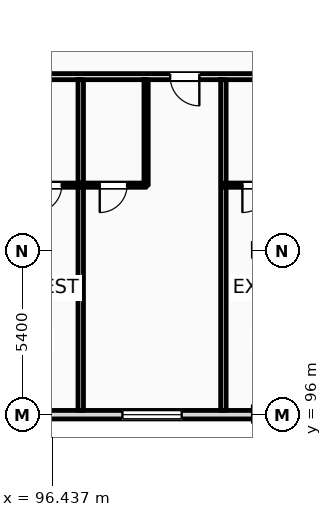
"""IFC4 building model, lengths in metres.
Left out: names, types, materials, properties, quantities, classifications, styles, units other than length and angle.
Written with IfcOpenShell. Run it as: python <this file> out.ifc"""

import sys

from ifc_helpers import new_model, si_unit, direction, frame, frame_2d, origin, place, context, subcontext, project, spatial, rectangle, extrude, element, fill, save


model = new_model("IFC4")
c1 = context("Model", 3, precision=1e-05, world=origin(), true_north=direction((0.0, 1.0)))
c2 = subcontext(c1, "Body", "Model", "MODEL_VIEW")
j1 = project(units=[si_unit("LENGTHUNIT", "METRE"), si_unit("PLANEANGLEUNIT", "RADIAN")], contexts=[c1])
p1 = place(None, origin())
s1 = spatial("IfcSite", under=j1, at=p1, CompositionType="ELEMENT")
p2 = place(p1, origin())
s2 = spatial("IfcBuilding", under=s1, at=p2, CompositionType="ELEMENT")
p3 = place(p2, frame((0.0, 0.0, 31.8)))
s3 = spatial("IfcBuildingStorey", under=s2, at=p3, CompositionType="ELEMENT", Elevation=31.8)
p4 = place(p3, frame((25.2, 96.0, 0.0), z_axis=(0.0, 0.0, 1.0), x_axis=(1.0, 0.0, 0.0)))
e1 = element("IfcWall", 1, at=p4, inside=s3, PredefinedType="STANDARD", context=c2, shape_type="SweptSolid", body=[
    extrude(rectangle(XDim=94.8, YDim=0.28, at=frame_2d((47.4, 0.0))), origin(), (0.0, 0.0, 1.0), 2.72),
])
p5 = place(p4, frame((16.394, 0.0, 0.9)))
e2 = element("IfcOpeningElement", 2, at=p5, cuts=e1, PredefinedType="OPENING", context=c2, shape_type="SweptSolid", body=[
    extrude(rectangle(XDim=2.0, YDim=1.64, at=frame_2d((1.0, 0.82))), frame((0.0, 0.15, 0.0), z_axis=(0.0, -1.0, 0.0), x_axis=(1.0, 0.0, 0.0)), (0.0, 0.0, 1.0), 0.3),
])
p6 = place(p4, frame((20.207, 0.0, 0.9)))
e3 = element("IfcOpeningElement", 3, at=p6, cuts=e1, PredefinedType="OPENING", context=c2, shape_type="SweptSolid", body=[
    extrude(rectangle(XDim=2.3, YDim=1.64, at=frame_2d((1.15, 0.82))), frame((0.0, 0.15, 0.0), z_axis=(0.0, -1.0, 0.0), x_axis=(1.0, 0.0, 0.0)), (0.0, 0.0, 1.0), 0.3),
])
p7 = place(p4, frame((24.287, 0.0, 0.9)))
e4 = element("IfcOpeningElement", 4, at=p7, cuts=e1, PredefinedType="OPENING", context=c2, shape_type="SweptSolid", body=[
    extrude(rectangle(XDim=2.358, YDim=1.64, at=frame_2d((1.179, 0.82))), frame((0.0, 0.15, 0.0), z_axis=(0.0, -1.0, 0.0), x_axis=(1.0, 0.0, 0.0)), (0.0, 0.0, 1.0), 0.3),
])
p8 = place(p4, frame((27.665, 0.0, 0.9)))
e5 = element("IfcOpeningElement", 5, at=p8, cuts=e1, PredefinedType="OPENING", context=c2, shape_type="SweptSolid", body=[
    extrude(rectangle(XDim=1.8, YDim=1.64, at=frame_2d((0.9, 0.82))), frame((0.0, 0.15, 0.0), z_axis=(0.0, -1.0, 0.0), x_axis=(1.0, 0.0, 0.0)), (0.0, 0.0, 1.0), 0.3),
])
p9 = place(p4, frame((32.103, 0.0, 0.9)))
e6 = element("IfcOpeningElement", 6, at=p9, cuts=e1, PredefinedType="OPENING", context=c2, shape_type="SweptSolid", body=[
    extrude(rectangle(XDim=2.359, YDim=1.64, at=frame_2d((1.179, 0.82))), frame((0.0, 0.15, 0.0), z_axis=(0.0, -1.0, 0.0), x_axis=(1.0, 0.0, 0.0)), (0.0, 0.0, 1.0), 0.3),
])
p10 = place(p4, frame((36.336, 0.0, 0.9)))
e7 = element("IfcOpeningElement", 7, at=p10, cuts=e1, PredefinedType="OPENING", context=c2, shape_type="SweptSolid", body=[
    extrude(rectangle(XDim=1.2, YDim=1.64, at=frame_2d((0.6, 0.82))), frame((0.0, 0.15, 0.0), z_axis=(0.0, -1.0, 0.0), x_axis=(1.0, 0.0, 0.0)), (0.0, 0.0, 1.0), 0.3),
])
p11 = place(p4, frame((56.177, 0.0, 0.9)))
e8 = element("IfcOpeningElement", 8, at=p11, cuts=e1, PredefinedType="OPENING", context=c2, shape_type="SweptSolid", body=[
    extrude(rectangle(XDim=1.35, YDim=1.64, at=frame_2d((0.675, 0.82))), frame((0.0, 0.15, 0.0), z_axis=(0.0, -1.0, 0.0), x_axis=(1.0, 0.0, 0.0)), (0.0, 0.0, 1.0), 0.3),
])
p12 = place(p4, frame((60.086, 0.0, 0.9)))
e9 = element("IfcOpeningElement", 9, at=p12, cuts=e1, PredefinedType="OPENING", context=c2, shape_type="SweptSolid", body=[
    extrude(rectangle(XDim=1.5, YDim=1.64, at=frame_2d((0.75, 0.82))), frame((0.0, 0.15, 0.0), z_axis=(0.0, -1.0, 0.0), x_axis=(1.0, 0.0, 0.0)), (0.0, 0.0, 1.0), 0.3),
])
p13 = place(p4, frame((64.838, 0.0, 0.9)))
e10 = element("IfcOpeningElement", 10, at=p13, cuts=e1, PredefinedType="OPENING", context=c2, shape_type="SweptSolid", body=[
    extrude(rectangle(XDim=1.65, YDim=1.64, at=frame_2d((0.825, 0.82))), frame((0.0, 0.15, 0.0), z_axis=(0.0, -1.0, 0.0), x_axis=(1.0, 0.0, 0.0)), (0.0, 0.0, 1.0), 0.3),
])
p14 = place(p4, frame((68.419, 0.0, 0.9)))
e11 = element("IfcOpeningElement", 11, at=p14, cuts=e1, PredefinedType="OPENING", context=c2, shape_type="SweptSolid", body=[
    extrude(rectangle(XDim=0.9, YDim=1.64, at=frame_2d((0.45, 0.82))), frame((0.0, 0.15, 0.0), z_axis=(0.0, -1.0, 0.0), x_axis=(1.0, 0.0, 0.0)), (0.0, 0.0, 1.0), 0.3),
])
p15 = place(p4, frame((73.544, 0.0, 0.9)))
e12 = element("IfcOpeningElement", 12, at=p15, cuts=e1, PredefinedType="OPENING", context=c2, shape_type="SweptSolid", body=[
    extrude(rectangle(XDim=1.95, YDim=1.64, at=frame_2d((0.975, 0.82))), frame((0.0, 0.15, 0.0), z_axis=(0.0, -1.0, 0.0), x_axis=(1.0, 0.0, 0.0)), (0.0, 0.0, 1.0), 0.3),
])
p16 = place(p4, frame((78.897, 0.0, 0.9)))
e13 = element("IfcOpeningElement", 13, at=p16, cuts=e1, PredefinedType="OPENING", context=c2, shape_type="SweptSolid", body=[
    extrude(rectangle(XDim=1.35, YDim=1.64, at=frame_2d((0.675, 0.82))), frame((0.0, 0.15, 0.0), z_axis=(0.0, -1.0, 0.0), x_axis=(1.0, 0.0, 0.0)), (0.0, 0.0, 1.0), 0.3),
])
p17 = place(p4, frame((82.249, 0.0, 0.9)))
e14 = element("IfcOpeningElement", 14, at=p17, cuts=e1, PredefinedType="OPENING", context=c2, shape_type="SweptSolid", body=[
    extrude(rectangle(XDim=2.25, YDim=1.64, at=frame_2d((1.125, 0.82))), frame((0.0, 0.15, 0.0), z_axis=(0.0, -1.0, 0.0), x_axis=(1.0, 0.0, 0.0)), (0.0, 0.0, 1.0), 0.3),
])
p18 = place(p4, frame((87.202, 0.0, 0.9)))
e15 = element("IfcOpeningElement", 15, at=p18, cuts=e1, PredefinedType="OPENING", context=c2, shape_type="SweptSolid", body=[
    extrude(rectangle(XDim=1.8, YDim=1.64, at=frame_2d((0.9, 0.82))), frame((0.0, 0.15, 0.0), z_axis=(0.0, -1.0, 0.0), x_axis=(1.0, 0.0, 0.0)), (0.0, 0.0, 1.0), 0.3),
])
p19 = place(p4, frame((90.867, 0.0, 0.9)))
e16 = element("IfcOpeningElement", 16, at=p19, cuts=e1, PredefinedType="OPENING", context=c2, shape_type="SweptSolid", body=[
    extrude(rectangle(XDim=2.55, YDim=1.64, at=frame_2d((1.275, 0.82))), frame((0.0, 0.15, 0.0), z_axis=(0.0, -1.0, 0.0), x_axis=(1.0, 0.0, 0.0)), (0.0, 0.0, 1.0), 0.3),
])
p20 = place(p3, frame((79.76, 107.12, 0.0), z_axis=(0.0, 0.0, 1.0), x_axis=(1.0, 0.0, 0.0)))
e17 = element("IfcWall", 17, at=p20, inside=s3, PredefinedType="PARTITIONING", context=c2, shape_type="SweptSolid", body=[
    extrude(rectangle(XDim=40.1, YDim=0.2, at=frame_2d((20.05, 0.0))), origin(), (0.0, 0.0, 1.0), 3.36),
])
p21 = place(p20, frame((2.887, 0.0, 0.0)))
e18 = element("IfcOpeningElement", 18, at=p21, cuts=e17, PredefinedType="OPENING", context=c2, shape_type="SweptSolid", body=[
    extrude(rectangle(XDim=0.96, YDim=2.2, at=frame_2d((0.48, 1.1))), frame((0.0, 0.11, 0.0), z_axis=(0.0, -1.0, 0.0), x_axis=(1.0, 0.0, 0.0)), (0.0, 0.0, 1.0), 0.22),
])
p22 = place(p20, frame((5.121, 0.0, 0.0)))
e19 = element("IfcOpeningElement", 19, at=p22, cuts=e17, PredefinedType="OPENING", context=c2, shape_type="SweptSolid", body=[
    extrude(rectangle(XDim=0.96, YDim=2.2, at=frame_2d((0.48, 1.1))), frame((0.0, 0.11, 0.0), z_axis=(0.0, -1.0, 0.0), x_axis=(1.0, 0.0, 0.0)), (0.0, 0.0, 1.0), 0.22),
])
p23 = place(p20, frame((11.698, 0.0, 0.0)))
e20 = element("IfcOpeningElement", 20, at=p23, cuts=e17, PredefinedType="OPENING", context=c2, shape_type="SweptSolid", body=[
    extrude(rectangle(XDim=0.96, YDim=2.2, at=frame_2d((0.48, 1.1))), frame((0.0, 0.11, 0.0), z_axis=(0.0, -1.0, 0.0), x_axis=(1.0, 0.0, 0.0)), (0.0, 0.0, 1.0), 0.22),
])
p24 = place(p20, frame((13.976, 0.0, 0.0)))
e21 = element("IfcOpeningElement", 21, at=p24, cuts=e17, PredefinedType="OPENING", context=c2, shape_type="SweptSolid", body=[
    extrude(rectangle(XDim=0.96, YDim=2.2, at=frame_2d((0.48, 1.1))), frame((0.0, 0.11, 0.0), z_axis=(0.0, -1.0, 0.0), x_axis=(1.0, 0.0, 0.0)), (0.0, 0.0, 1.0), 0.22),
])
p25 = place(p20, frame((20.554, 0.0, 0.0)))
e22 = element("IfcOpeningElement", 22, at=p25, cuts=e17, PredefinedType="OPENING", context=c2, shape_type="SweptSolid", body=[
    extrude(rectangle(XDim=0.96, YDim=2.2, at=frame_2d((0.48, 1.1))), frame((0.0, 0.11, 0.0), z_axis=(0.0, -1.0, 0.0), x_axis=(1.0, 0.0, 0.0)), (0.0, 0.0, 1.0), 0.22),
])
p26 = place(p20, frame((24.982, 0.0, 0.0)))
e23 = element("IfcOpeningElement", 23, at=p26, cuts=e17, PredefinedType="OPENING", context=c2, shape_type="SweptSolid", body=[
    extrude(rectangle(XDim=0.96, YDim=2.2, at=frame_2d((0.48, 1.1))), frame((0.0, 0.11, 0.0), z_axis=(0.0, -1.0, 0.0), x_axis=(1.0, 0.0, 0.0)), (0.0, 0.0, 1.0), 0.22),
])
p27 = place(p20, frame((29.409, 0.0, 0.0)))
e24 = element("IfcOpeningElement", 24, at=p27, cuts=e17, PredefinedType="OPENING", context=c2, shape_type="SweptSolid", body=[
    extrude(rectangle(XDim=0.96, YDim=2.2, at=frame_2d((0.48, 1.1))), frame((0.0, 0.11, 0.0), z_axis=(0.0, -1.0, 0.0), x_axis=(1.0, 0.0, 0.0)), (0.0, 0.0, 1.0), 0.22),
])
p28 = place(p20, frame((33.837, 0.0, 0.0)))
e25 = element("IfcOpeningElement", 25, at=p28, cuts=e17, PredefinedType="OPENING", context=c2, shape_type="SweptSolid", body=[
    extrude(rectangle(XDim=0.96, YDim=2.2, at=frame_2d((0.48, 1.1))), frame((0.0, 0.11, 0.0), z_axis=(0.0, -1.0, 0.0), x_axis=(1.0, 0.0, 0.0)), (0.0, 0.0, 1.0), 0.22),
])
p29 = place(p20, frame((36.027, 0.0, 0.0)))
e26 = element("IfcOpeningElement", 26, at=p29, cuts=e17, PredefinedType="OPENING", context=c2, shape_type="SweptSolid", body=[
    extrude(rectangle(XDim=0.96, YDim=2.2, at=frame_2d((0.48, 1.1))), frame((0.0, 0.11, 0.0), z_axis=(0.0, -1.0, 0.0), x_axis=(1.0, 0.0, 0.0)), (0.0, 0.0, 1.0), 0.22),
])
p30 = place(p3, frame((97.373, 96.14, 0.0), z_axis=(0.0, 0.0, 1.0), x_axis=(0.0, 1.0, 0.0)))
e27 = element("IfcWall", 27, at=p30, inside=s3, PredefinedType="PARTITIONING", context=c2, shape_type="SweptSolid", body=[
    extrude(rectangle(XDim=10.88, YDim=0.18, at=frame_2d((5.44, 0.0))), origin(), (0.0, 0.0, 1.0), 3.36),
])
p31 = place(p3, frame((95.223, 103.55, 0.0), z_axis=(0.0, 0.0, 1.0), x_axis=(1.0, 0.0, 0.0)))
e28 = element("IfcWall", 28, at=p31, inside=s3, PredefinedType="PARTITIONING", context=c2, shape_type="SweptSolid", body=[
    extrude(rectangle(XDim=2.15, YDim=0.14, at=frame_2d((1.075, 0.0))), origin(), (0.0, 0.0, 1.0), 3.36),
])
p32 = place(p31, frame((0.625, 0.0, 0.0)))
e29 = element("IfcOpeningElement", 29, at=p32, cuts=e28, PredefinedType="OPENING", context=c2, shape_type="SweptSolid", body=[
    extrude(rectangle(XDim=0.9, YDim=2.1, at=frame_2d((0.45, 1.05))), frame((0.0, 0.08, 0.0), z_axis=(0.0, -1.0, 0.0), x_axis=(1.0, 0.0, 0.0)), (0.0, 0.0, 1.0), 0.16),
])
p33 = place(p3, frame((102.065, 96.14, 0.0), z_axis=(0.0, 0.0, 1.0), x_axis=(0.0, 1.0, 0.0)))
e30 = element("IfcWall", 30, at=p33, inside=s3, PredefinedType="PARTITIONING", context=c2, shape_type="SweptSolid", body=[
    extrude(rectangle(XDim=10.88, YDim=0.18, at=frame_2d((5.44, 0.0))), origin(), (0.0, 0.0, 1.0), 3.36),
])
p34 = place(p3, frame((99.523, 103.55, 0.0), z_axis=(0.0, 0.0, 1.0), x_axis=(0.0, 1.0, 0.0)))
e31 = element("IfcWall", 31, at=p34, inside=s3, PredefinedType="PARTITIONING", context=c2, shape_type="SweptSolid", body=[
    extrude(rectangle(XDim=3.47, YDim=0.14, at=frame_2d((1.735, 0.0))), origin(), (0.0, 0.0, 1.0), 3.36),
])
p35 = place(p3, frame((97.373, 103.55, 0.0), z_axis=(0.0, 0.0, 1.0), x_axis=(1.0, 0.0, 0.0)))
e32 = element("IfcWall", 32, at=p35, inside=s3, PredefinedType="PARTITIONING", context=c2, shape_type="SweptSolid", body=[
    extrude(rectangle(XDim=2.15, YDim=0.14, at=frame_2d((1.075, 0.0))), origin(), (0.0, 0.0, 1.0), 3.36),
])
p36 = place(p35, frame((0.625, 0.0, 0.0)))
e33 = element("IfcOpeningElement", 33, at=p36, cuts=e32, PredefinedType="OPENING", context=c2, shape_type="SweptSolid", body=[
    extrude(rectangle(XDim=0.9, YDim=2.1, at=frame_2d((0.45, 1.05))), frame((0.0, 0.08, 0.0), z_axis=(0.0, -1.0, 0.0), x_axis=(1.0, 0.0, 0.0)), (0.0, 0.0, 1.0), 0.16),
])
p37 = place(p3, frame((102.065, 103.55, 0.0), z_axis=(0.0, 0.0, 1.0), x_axis=(1.0, 0.0, 0.0)))
e34 = element("IfcWall", 34, at=p37, inside=s3, PredefinedType="PARTITIONING", context=c2, shape_type="SweptSolid", body=[
    extrude(rectangle(XDim=2.15, YDim=0.14, at=frame_2d((1.075, 0.0))), origin(), (0.0, 0.0, 1.0), 3.36),
])
p38 = place(p37, frame((0.625, 0.0, 0.0)))
e35 = element("IfcOpeningElement", 35, at=p38, cuts=e34, PredefinedType="OPENING", context=c2, shape_type="SweptSolid", body=[
    extrude(rectangle(XDim=0.9, YDim=2.1, at=frame_2d((0.45, 1.05))), frame((0.0, 0.08, 0.0), z_axis=(0.0, -1.0, 0.0), x_axis=(1.0, 0.0, 0.0)), (0.0, 0.0, 1.0), 0.16),
])
p39 = place(p15, origin())
e36 = element("IfcWindow", 36, at=p39, inside=s3, PartitioningType="DOUBLE_PANEL_VERTICAL", PredefinedType="WINDOW", context=c2, shape_type="SweptSolid", body=[
    extrude(rectangle(XDim=1.95, YDim=1.64, at=frame_2d((0.975, 0.82))), frame((0.0, 0.03, 0.0), z_axis=(0.0, -1.0, 0.0), x_axis=(1.0, 0.0, 0.0)), (0.0, 0.0, 1.0), 0.06),
])
fill(e12, e36)
p40 = place(p32, frame((0.9, 0.0, 0.0), z_axis=(0.0, 0.0, 1.0), x_axis=(-1.0, 0.0, 0.0)))
e37 = element("IfcDoor", 37, at=p40, inside=s3, OperationType="SINGLE_SWING_LEFT", PredefinedType="DOOR", context=c2, shape_type="SweptSolid", body=[
    extrude(rectangle(XDim=0.9, YDim=2.1, at=frame_2d((0.45, 1.05))), frame((0.0, 0.025, 0.0), z_axis=(0.0, -1.0, 0.0), x_axis=(1.0, 0.0, 0.0)), (0.0, 0.0, 1.0), 0.05),
])
fill(e29, e37)
p41 = place(p25, frame((0.96, 0.0, 0.0), z_axis=(0.0, 0.0, 1.0), x_axis=(-1.0, 0.0, 0.0)))
e38 = element("IfcDoor", 38, at=p41, inside=s3, OperationType="SINGLE_SWING_RIGHT", PredefinedType="DOOR", context=c2, shape_type="SweptSolid", body=[
    extrude(rectangle(XDim=0.96, YDim=2.2, at=frame_2d((0.48, 1.1))), frame((0.0, 0.025, 0.0), z_axis=(0.0, -1.0, 0.0), x_axis=(1.0, 0.0, 0.0)), (0.0, 0.0, 1.0), 0.05),
])
fill(e22, e38)
p42 = place(p36, frame((0.9, 0.0, 0.0), z_axis=(0.0, 0.0, 1.0), x_axis=(-1.0, 0.0, 0.0)))
e39 = element("IfcDoor", 39, at=p42, inside=s3, OperationType="SINGLE_SWING_LEFT", PredefinedType="DOOR", context=c2, shape_type="SweptSolid", body=[
    extrude(rectangle(XDim=0.9, YDim=2.1, at=frame_2d((0.45, 1.05))), frame((0.0, 0.025, 0.0), z_axis=(0.0, -1.0, 0.0), x_axis=(1.0, 0.0, 0.0)), (0.0, 0.0, 1.0), 0.05),
])
fill(e33, e39)
p43 = place(p38, frame((0.9, 0.0, 0.0), z_axis=(0.0, 0.0, 1.0), x_axis=(-1.0, 0.0, 0.0)))
e40 = element("IfcDoor", 40, at=p43, inside=s3, OperationType="SINGLE_SWING_LEFT", PredefinedType="DOOR", context=c2, shape_type="SweptSolid", body=[
    extrude(rectangle(XDim=0.9, YDim=2.1, at=frame_2d((0.45, 1.05))), frame((0.0, 0.025, 0.0), z_axis=(0.0, -1.0, 0.0), x_axis=(1.0, 0.0, 0.0)), (0.0, 0.0, 1.0), 0.05),
])
fill(e35, e40)
save(model, sys.argv[1])
